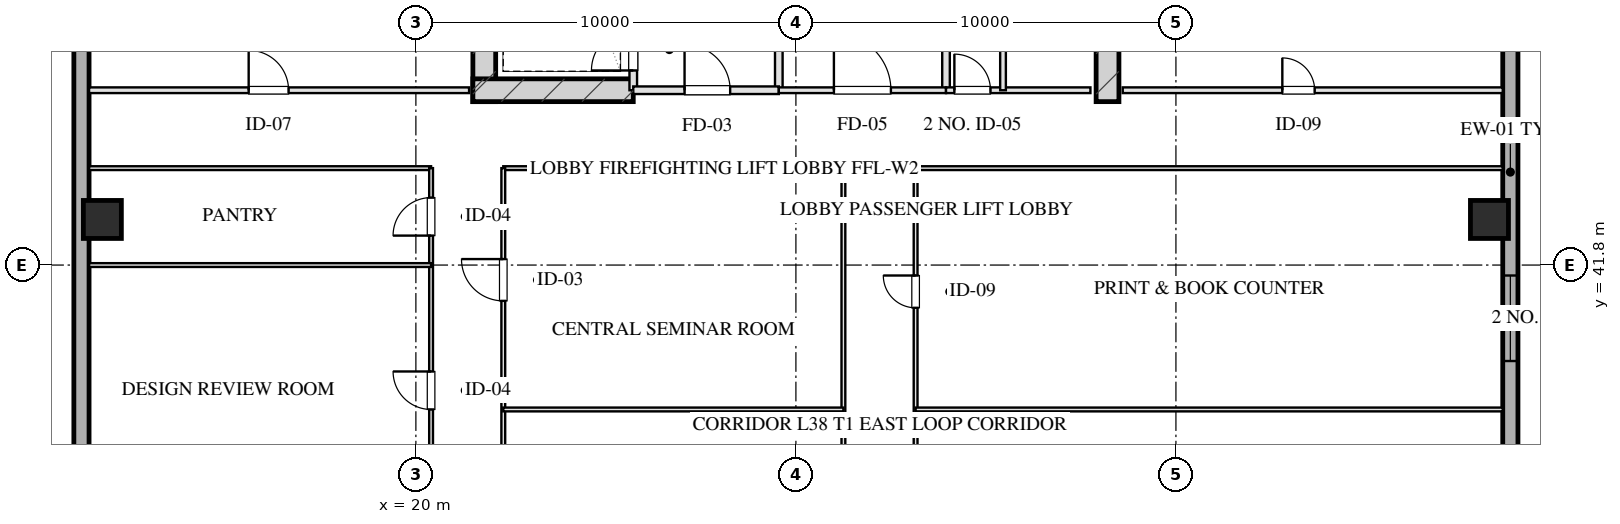
"""IFC4 building model, lengths in metres.
Left out: names, types, materials, properties, quantities, classifications, styles, units other than length and angle.
Written with IfcOpenShell. Run it as: python <this file> out.ifc"""

import sys

from ifc_helpers import new_model, si_unit, direction, frame, frame_2d, origin, origin_2d, place, context, subcontext, project, spatial, rectangle, hollow_rectangle, extrude, element, fill, save


model = new_model("IFC4")
c1 = context("Model", 3, precision=1e-05, world=origin(), true_north=direction((0.0, 1.0)))
c2 = subcontext(c1, "Body", "Model", "MODEL_VIEW")
j1 = project(units=[si_unit("LENGTHUNIT", "METRE"), si_unit("PLANEANGLEUNIT", "RADIAN")], contexts=[c1])
p1 = place(None, origin())
s1 = spatial("IfcSite", under=j1, at=p1, CompositionType="ELEMENT")
p2 = place(p1, origin())
s2 = spatial("IfcBuilding", under=s1, at=p2, CompositionType="ELEMENT")
p3 = place(p2, frame((0.0, 0.0, 146.05)))
s3 = spatial("IfcBuildingStorey", under=s2, at=p3, CompositionType="ELEMENT", Elevation=146.05)
for number, where, z_axis, x_axis in (
    (1, (21.8, 46.1, 0.0), (0.0, 0.0, 1.0), (0.0, 1.0, 0.0)),
    (2, (38.2, 46.1, 0.0), (0.0, 0.0, 1.0), (0.0, 1.0, 0.0)),
):
    element("IfcWall", number, at=place(p3, frame(where, z_axis=z_axis, x_axis=x_axis)), inside=s3, PredefinedType="SHEAR", context=c2, shape_type="SweptSolid", body=[
        extrude(rectangle(XDim=9.48, YDim=0.6, at=frame_2d((4.74, 0.0))), origin(), (0.0, 0.0, 1.0), 3.45),
    ])
p4 = place(p3, frame((21.5, 46.4, 0.0), z_axis=(0.0, 0.0, 1.0), x_axis=(1.0, 0.0, 0.0)))
e3 = element("IfcWall", 3, at=p4, inside=s3, PredefinedType="SHEAR", context=c2, shape_type="SweptSolid", body=[
    extrude(rectangle(XDim=4.22, YDim=0.6, at=frame_2d((2.11, 0.0))), origin(), (0.0, 0.0, 1.0), 3.45),
])
for number, where, z_axis, x_axis in (
    (4, (11.75, 43.0, 0.0), (0.0, 0.0, 1.0), (1.0, 0.0, 0.0)),
    (5, (48.25, 43.0, 0.0), (0.0, 0.0, 1.0), (1.0, 0.0, 0.0)),
):
    element("IfcColumn", number, at=place(p3, frame(where, z_axis=z_axis, x_axis=x_axis)), inside=s3, PredefinedType="COLUMN", context=c2, shape_type="SweptSolid", body=[
        extrude(hollow_rectangle(XDim=1.0, YDim=1.0, WallThickness=0.036, at=origin_2d()), origin(), (0.0, 0.0, 1.0), 3.451),
    ])
p5 = place(p3, frame((11.2, 9.0, 0.0), z_axis=(0.0, 0.0, 1.0), x_axis=(0.0, 1.0, 0.0)))
e6 = element("IfcWall", 6, at=p5, inside=s3, PredefinedType="SOLIDWALL", context=c2, shape_type="SweptSolid", body=[
    extrude(rectangle(XDim=50.0, YDim=0.4, at=frame_2d((25.0, 0.0))), origin(), (0.0, 0.0, 1.0), 2.61),
])
p6 = place(p5, frame((20.05, 0.0, 0.0)))
e7 = element("IfcOpeningElement", 7, at=p6, cuts=e6, PredefinedType="OPENING", context=c2, shape_type="SweptSolid", body=[
    extrude(rectangle(XDim=1.1, YDim=2.15, at=frame_2d((0.55, 1.075))), frame((0.0, 0.21, 0.0), z_axis=(0.0, -1.0, 0.0), x_axis=(1.0, 0.0, 0.0)), (0.0, 0.0, 1.0), 0.42),
])
p7 = place(p3, frame((48.8, 59.0, 0.0), z_axis=(0.0, 0.0, 1.0), x_axis=(0.0, -1.0, 0.0)))
e8 = element("IfcWall", 8, at=p7, inside=s3, PredefinedType="SOLIDWALL", context=c2, shape_type="SweptSolid", body=[
    extrude(rectangle(XDim=50.0, YDim=0.4, at=frame_2d((25.0, 0.0))), origin(), (0.0, 0.0, 1.0), 2.61),
])
p8 = place(p7, frame((17.475, 0.0, 0.75)))
e9 = element("IfcOpeningElement", 9, at=p8, cuts=e8, PredefinedType="OPENING", context=c2, shape_type="SweptSolid", body=[
    extrude(rectangle(XDim=2.25, YDim=1.46, at=frame_2d((1.125, 0.73))), frame((0.0, 0.21, 0.0), z_axis=(0.0, -1.0, 0.0), x_axis=(1.0, 0.0, 0.0)), (0.0, 0.0, 1.0), 0.42),
])
p9 = place(p7, frame((30.258, 0.0, 0.0)))
e10 = element("IfcOpeningElement", 10, at=p9, cuts=e8, PredefinedType="OPENING", context=c2, shape_type="SweptSolid", body=[
    extrude(rectangle(XDim=1.1, YDim=2.15, at=frame_2d((0.55, 1.075))), frame((0.0, 0.21, 0.0), z_axis=(0.0, -1.0, 0.0), x_axis=(1.0, 0.0, 0.0)), (0.0, 0.0, 1.0), 0.42),
])
p10 = place(p3, frame((25.72, 46.4, 0.0), z_axis=(0.0, 0.0, 1.0), x_axis=(0.0, 1.0, 0.0)))
e11 = element("IfcWall", 11, at=p10, inside=s3, PredefinedType="PARTITIONING", context=c2, shape_type="SweptSolid", body=[
    extrude(rectangle(XDim=1.9, YDim=0.2, at=frame_2d((0.95, 0.0))), origin(), (0.0, 0.0, 1.0), 3.175),
])
p11 = place(p10, frame((0.52, 0.0, 0.0)))
e12 = element("IfcOpeningElement", 12, at=p11, cuts=e11, PredefinedType="OPENING", context=c2, shape_type="SweptSolid", body=[
    extrude(rectangle(XDim=1.1, YDim=2.05, at=frame_2d((0.55, 1.025))), frame((0.0, 0.11, 0.0), z_axis=(0.0, -1.0, 0.0), x_axis=(1.0, 0.0, 0.0)), (0.0, 0.0, 1.0), 0.22),
])
p12 = place(p3, frame((29.55, 46.4, 0.0), z_axis=(0.0, 0.0, 1.0), x_axis=(0.0, 1.0, 0.0)))
e13 = element("IfcWall", 13, at=p12, inside=s3, PredefinedType="PARTITIONING", context=c2, shape_type="SweptSolid", body=[
    extrude(rectangle(XDim=8.43, YDim=0.2, at=frame_2d((4.215, 0.0))), origin(), (0.0, 0.0, 1.0), 3.175),
])
p13 = place(p3, frame((25.72, 46.4, 0.0), z_axis=(0.0, 0.0, 1.0), x_axis=(1.0, 0.0, 0.0)))
e14 = element("IfcWall", 14, at=p13, inside=s3, PredefinedType="PARTITIONING", context=c2, shape_type="SweptSolid", body=[
    extrude(rectangle(XDim=3.83, YDim=0.2, at=frame_2d((1.915, 0.0))), origin(), (0.0, 0.0, 1.0), 3.175),
])
p14 = place(p13, frame((1.35, 0.0, 0.0)))
e15 = element("IfcOpeningElement", 15, at=p14, cuts=e14, PredefinedType="OPENING", context=c2, shape_type="SweptSolid", body=[
    extrude(rectangle(XDim=1.2, YDim=2.05, at=frame_2d((0.6, 1.025))), frame((0.0, 0.11, 0.0), z_axis=(0.0, -1.0, 0.0), x_axis=(1.0, 0.0, 0.0)), (0.0, 0.0, 1.0), 0.22),
])
p15 = place(p3, frame((33.95, 46.4, 0.0), z_axis=(0.0, 0.0, 1.0), x_axis=(0.0, 1.0, 0.0)))
e16 = element("IfcWall", 16, at=p15, inside=s3, PredefinedType="PARTITIONING", context=c2, shape_type="SweptSolid", body=[
    extrude(rectangle(XDim=8.43, YDim=0.2, at=frame_2d((4.215, 0.0))), origin(), (0.0, 0.0, 1.0), 3.175),
])
p16 = place(p3, frame((29.55, 46.4, 0.0), z_axis=(0.0, 0.0, 1.0), x_axis=(1.0, 0.0, 0.0)))
e17 = element("IfcWall", 17, at=p16, inside=s3, PredefinedType="PARTITIONING", context=c2, shape_type="SweptSolid", body=[
    extrude(rectangle(XDim=4.4, YDim=0.15, at=frame_2d((2.2, 0.0))), origin(), (0.0, 0.0, 1.0), 3.175),
])
p17 = place(p16, frame((1.45, 0.0, 0.0)))
e18 = element("IfcOpeningElement", 18, at=p17, cuts=e17, PredefinedType="OPENING", context=c2, shape_type="SweptSolid", body=[
    extrude(rectangle(XDim=1.5, YDim=2.05, at=frame_2d((0.75, 1.025))), frame((0.0, 0.085, 0.0), z_axis=(0.0, -1.0, 0.0), x_axis=(1.0, 0.0, 0.0)), (0.0, 0.0, 1.0), 0.17),
])
p18 = place(p3, frame((33.95, 46.4, 0.0), z_axis=(0.0, 0.0, 1.0), x_axis=(1.0, 0.0, 0.0)))
e19 = element("IfcWall", 19, at=p18, inside=s3, PredefinedType="PARTITIONING", context=c2, shape_type="SweptSolid", body=[
    extrude(rectangle(XDim=3.8, YDim=0.15, at=frame_2d((1.9, 0.0))), origin(), (0.0, 0.0, 1.0), 3.175),
])
p19 = place(p18, frame((0.22, 0.0, 0.0)))
e20 = element("IfcOpeningElement", 20, at=p19, cuts=e19, PredefinedType="OPENING", context=c2, shape_type="SweptSolid", body=[
    extrude(rectangle(XDim=0.95, YDim=2.05, at=frame_2d((0.475, 1.025))), frame((0.0, 0.085, 0.0), z_axis=(0.0, -1.0, 0.0), x_axis=(1.0, 0.0, 0.0)), (0.0, 0.0, 1.0), 0.17),
])
p20 = place(p3, frame((35.45, 46.4, 0.0), z_axis=(0.0, 0.0, 1.0), x_axis=(0.0, 1.0, 0.0)))
e21 = element("IfcWall", 21, at=p20, inside=s3, PredefinedType="PARTITIONING", context=c2, shape_type="SweptSolid", body=[
    extrude(rectangle(XDim=8.43, YDim=0.15, at=frame_2d((4.215, 0.0))), origin(), (0.0, 0.0, 1.0), 2.765),
])
p21 = place(p20, frame((2.55, 0.0, 0.0)))
e22 = element("IfcOpeningElement", 22, at=p21, cuts=e21, PredefinedType="OPENING", context=c2, shape_type="SweptSolid", body=[
    extrude(rectangle(XDim=0.95, YDim=2.05, at=frame_2d((0.475, 1.025))), frame((0.0, 0.085, 0.0), z_axis=(0.0, -1.0, 0.0), x_axis=(1.0, 0.0, 0.0)), (0.0, 0.0, 1.0), 0.17),
])
p22 = place(p20, frame((4.7, 0.0, 0.0)))
e23 = element("IfcOpeningElement", 23, at=p22, cuts=e21, PredefinedType="OPENING", context=c2, shape_type="SweptSolid", body=[
    extrude(rectangle(XDim=0.9, YDim=2.05, at=frame_2d((0.45, 1.025))), frame((0.0, 0.085, 0.0), z_axis=(0.0, -1.0, 0.0), x_axis=(1.0, 0.0, 0.0)), (0.0, 0.0, 1.0), 0.17),
])
p23 = place(p20, frame((6.8, 0.0, 0.0)))
e24 = element("IfcOpeningElement", 24, at=p23, cuts=e21, PredefinedType="OPENING", context=c2, shape_type="SweptSolid", body=[
    extrude(rectangle(XDim=0.9, YDim=2.05, at=frame_2d((0.45, 1.025))), frame((0.0, 0.085, 0.0), z_axis=(0.0, -1.0, 0.0), x_axis=(1.0, 0.0, 0.0)), (0.0, 0.0, 1.0), 0.17),
])
p24 = place(p3, frame((11.4, 46.4, 0.0), z_axis=(0.0, 0.0, 1.0), x_axis=(1.0, 0.0, 0.0)))
e25 = element("IfcWall", 25, at=p24, inside=s3, PredefinedType="PARTITIONING", context=c2, shape_type="SweptSolid", body=[
    extrude(rectangle(XDim=10.0, YDim=0.15, at=frame_2d((5.0, 0.0))), origin(), (0.0, 0.0, 1.0), 3.175),
])
p25 = place(p24, frame((4.2, 0.0, 0.0)))
e26 = element("IfcOpeningElement", 26, at=p25, cuts=e25, PredefinedType="OPENING", context=c2, shape_type="SweptSolid", body=[
    extrude(rectangle(XDim=1.05, YDim=2.05, at=frame_2d((0.525, 1.025))), frame((0.0, 0.085, 0.0), z_axis=(0.0, -1.0, 0.0), x_axis=(1.0, 0.0, 0.0)), (0.0, 0.0, 1.0), 0.17),
])
p26 = place(p3, frame((38.6, 46.4, 0.0), z_axis=(0.0, 0.0, 1.0), x_axis=(1.0, 0.0, 0.0)))
e27 = element("IfcWall", 27, at=p26, inside=s3, PredefinedType="PARTITIONING", context=c2, shape_type="SweptSolid", body=[
    extrude(rectangle(XDim=10.0, YDim=0.15, at=frame_2d((5.0, 0.0))), origin(), (0.0, 0.0, 1.0), 3.175),
])
p27 = place(p26, frame((4.2, 0.0, 0.0)))
e28 = element("IfcOpeningElement", 28, at=p27, cuts=e27, PredefinedType="OPENING", context=c2, shape_type="SweptSolid", body=[
    extrude(rectangle(XDim=0.85, YDim=2.05, at=frame_2d((0.425, 1.025))), frame((0.0, 0.085, 0.0), z_axis=(0.0, -1.0, 0.0), x_axis=(1.0, 0.0, 0.0)), (0.0, 0.0, 1.0), 0.17),
])
p28 = place(p3, frame((11.4, 44.35, 0.0), z_axis=(0.0, 0.0, 1.0), x_axis=(1.0, 0.0, 0.0)))
e29 = element("IfcWall", 29, at=p28, inside=s3, PredefinedType="MOVABLE", context=c2, shape_type="SweptSolid", body=[
    extrude(rectangle(XDim=9.0, YDim=0.1, at=frame_2d((4.5, 0.0))), origin(), (0.0, 0.0, 1.0), 3.175),
])
p29 = place(p3, frame((22.3, 44.35, 0.0), z_axis=(0.0, 0.0, 1.0), x_axis=(1.0, 0.0, 0.0)))
e30 = element("IfcWall", 30, at=p29, inside=s3, PredefinedType="MOVABLE", context=c2, shape_type="SweptSolid", body=[
    extrude(rectangle(XDim=8.95, YDim=0.1, at=frame_2d((4.475, 0.0))), origin(), (0.0, 0.0, 1.0), 3.175),
])
p30 = place(p3, frame((33.15, 44.35, 0.0), z_axis=(0.0, 0.0, 1.0), x_axis=(1.0, 0.0, 0.0)))
e31 = element("IfcWall", 31, at=p30, inside=s3, PredefinedType="MOVABLE", context=c2, shape_type="SweptSolid", body=[
    extrude(rectangle(XDim=15.45, YDim=0.1, at=frame_2d((7.725, 0.0))), origin(), (0.0, 0.0, 1.0), 3.175),
])
p31 = place(p3, frame((20.4, 23.65, 0.0), z_axis=(0.0, 0.0, 1.0), x_axis=(0.0, 1.0, 0.0)))
e32 = element("IfcWall", 32, at=p31, inside=s3, PredefinedType="MOVABLE", context=c2, shape_type="SweptSolid", body=[
    extrude(rectangle(XDim=20.7, YDim=0.1, at=frame_2d((10.35, 0.0))), origin(), (0.0, 0.0, 1.0), 3.175),
])
p32 = place(p31, frame((0.775, 0.0, 0.0)))
e33 = element("IfcOpeningElement", 33, at=p32, cuts=e32, PredefinedType="OPENING", context=c2, shape_type="SweptSolid", body=[
    extrude(rectangle(XDim=1.0, YDim=2.05, at=frame_2d((0.5, 1.025))), frame((0.0, 0.06, 0.0), z_axis=(0.0, -1.0, 0.0), x_axis=(1.0, 0.0, 0.0)), (0.0, 0.0, 1.0), 0.12),
])
p33 = place(p31, frame((5.35, 0.0, 0.0)))
e34 = element("IfcOpeningElement", 34, at=p33, cuts=e32, PredefinedType="OPENING", context=c2, shape_type="SweptSolid", body=[
    extrude(rectangle(XDim=1.0, YDim=2.05, at=frame_2d((0.5, 1.025))), frame((0.0, 0.06, 0.0), z_axis=(0.0, -1.0, 0.0), x_axis=(1.0, 0.0, 0.0)), (0.0, 0.0, 1.0), 0.12),
])
p34 = place(p31, frame((9.85, 0.0, 0.0)))
e35 = element("IfcOpeningElement", 35, at=p34, cuts=e32, PredefinedType="OPENING", context=c2, shape_type="SweptSolid", body=[
    extrude(rectangle(XDim=1.0, YDim=2.05, at=frame_2d((0.5, 1.025))), frame((0.0, 0.06, 0.0), z_axis=(0.0, -1.0, 0.0), x_axis=(1.0, 0.0, 0.0)), (0.0, 0.0, 1.0), 0.12),
])
p35 = place(p31, frame((14.35, 0.0, 0.0)))
e36 = element("IfcOpeningElement", 36, at=p35, cuts=e32, PredefinedType="OPENING", context=c2, shape_type="SweptSolid", body=[
    extrude(rectangle(XDim=1.0, YDim=2.05, at=frame_2d((0.5, 1.025))), frame((0.0, 0.06, 0.0), z_axis=(0.0, -1.0, 0.0), x_axis=(1.0, 0.0, 0.0)), (0.0, 0.0, 1.0), 0.12),
])
p36 = place(p31, frame((18.925, 0.0, 0.0)))
e37 = element("IfcOpeningElement", 37, at=p36, cuts=e32, PredefinedType="OPENING", context=c2, shape_type="SweptSolid", body=[
    extrude(rectangle(XDim=1.0, YDim=2.05, at=frame_2d((0.5, 1.025))), frame((0.0, 0.06, 0.0), z_axis=(0.0, -1.0, 0.0), x_axis=(1.0, 0.0, 0.0)), (0.0, 0.0, 1.0), 0.12),
])
p37 = place(p3, frame((22.3, 23.65, 0.0), z_axis=(0.0, 0.0, 1.0), x_axis=(0.0, 1.0, 0.0)))
e38 = element("IfcWall", 38, at=p37, inside=s3, PredefinedType="MOVABLE", context=c2, shape_type="SweptSolid", body=[
    extrude(rectangle(XDim=20.7, YDim=0.1, at=frame_2d((10.35, 0.0))), origin(), (0.0, 0.0, 1.0), 3.175),
])
p38 = place(p37, frame((2.857, 0.0, 0.0)))
e39 = element("IfcOpeningElement", 39, at=p38, cuts=e38, PredefinedType="OPENING", context=c2, shape_type="SweptSolid", body=[
    extrude(rectangle(XDim=1.1, YDim=2.05, at=frame_2d((0.55, 1.025))), frame((0.0, 0.06, 0.0), z_axis=(0.0, -1.0, 0.0), x_axis=(1.0, 0.0, 0.0)), (0.0, 0.0, 1.0), 0.12),
])
p39 = place(p37, frame((17.208, 0.0, 0.0)))
e40 = element("IfcOpeningElement", 40, at=p39, cuts=e38, PredefinedType="OPENING", context=c2, shape_type="SweptSolid", body=[
    extrude(rectangle(XDim=1.1, YDim=2.05, at=frame_2d((0.55, 1.025))), frame((0.0, 0.06, 0.0), z_axis=(0.0, -1.0, 0.0), x_axis=(1.0, 0.0, 0.0)), (0.0, 0.0, 1.0), 0.12),
])
p40 = place(p3, frame((31.25, 23.65, 0.0), z_axis=(0.0, 0.0, 1.0), x_axis=(0.0, 1.0, 0.0)))
e41 = element("IfcWall", 41, at=p40, inside=s3, PredefinedType="MOVABLE", context=c2, shape_type="SweptSolid", body=[
    extrude(rectangle(XDim=20.7, YDim=0.1, at=frame_2d((10.35, 0.0))), origin(), (0.0, 0.0, 1.0), 3.175),
])
p41 = place(p40, frame((9.71, 0.0, 0.0)))
e42 = element("IfcOpeningElement", 42, at=p41, cuts=e41, PredefinedType="OPENING", context=c2, shape_type="SweptSolid", body=[
    extrude(rectangle(XDim=1.1, YDim=2.05, at=frame_2d((0.55, 1.025))), frame((0.0, 0.06, 0.0), z_axis=(0.0, -1.0, 0.0), x_axis=(1.0, 0.0, 0.0)), (0.0, 0.0, 1.0), 0.12),
])
p42 = place(p3, frame((33.15, 23.65, 0.0), z_axis=(0.0, 0.0, 1.0), x_axis=(0.0, 1.0, 0.0)))
e43 = element("IfcWall", 43, at=p42, inside=s3, PredefinedType="MOVABLE", context=c2, shape_type="SweptSolid", body=[
    extrude(rectangle(XDim=20.7, YDim=0.1, at=frame_2d((10.35, 0.0))), origin(), (0.0, 0.0, 1.0), 3.175),
])
p43 = place(p42, frame((2.667, 0.0, 0.0)))
e44 = element("IfcOpeningElement", 44, at=p43, cuts=e43, PredefinedType="OPENING", context=c2, shape_type="SweptSolid", body=[
    extrude(rectangle(XDim=1.0, YDim=2.05, at=frame_2d((0.5, 1.025))), frame((0.0, 0.06, 0.0), z_axis=(0.0, -1.0, 0.0), x_axis=(1.0, 0.0, 0.0)), (0.0, 0.0, 1.0), 0.12),
])
p44 = place(p42, frame((9.843, 0.0, 0.0)))
e45 = element("IfcOpeningElement", 45, at=p44, cuts=e43, PredefinedType="OPENING", context=c2, shape_type="SweptSolid", body=[
    extrude(rectangle(XDim=1.0, YDim=2.05, at=frame_2d((0.5, 1.025))), frame((0.0, 0.06, 0.0), z_axis=(0.0, -1.0, 0.0), x_axis=(1.0, 0.0, 0.0)), (0.0, 0.0, 1.0), 0.12),
])
p45 = place(p42, frame((17.025, 0.0, 0.0)))
e46 = element("IfcOpeningElement", 46, at=p45, cuts=e43, PredefinedType="OPENING", context=c2, shape_type="SweptSolid", body=[
    extrude(rectangle(XDim=0.85, YDim=2.05, at=frame_2d((0.425, 1.025))), frame((0.0, 0.06, 0.0), z_axis=(0.0, -1.0, 0.0), x_axis=(1.0, 0.0, 0.0)), (0.0, 0.0, 1.0), 0.12),
])
p46 = place(p3, frame((22.3, 38.0, 0.0), z_axis=(0.0, 0.0, 1.0), x_axis=(1.0, 0.0, 0.0)))
e47 = element("IfcWall", 47, at=p46, inside=s3, PredefinedType="MOVABLE", context=c2, shape_type="SweptSolid", body=[
    extrude(rectangle(XDim=8.95, YDim=0.1, at=frame_2d((4.475, 0.0))), origin(), (0.0, 0.0, 1.0), 3.175),
])
p47 = place(p3, frame((11.4, 41.8, 0.0), z_axis=(0.0, 0.0, 1.0), x_axis=(1.0, 0.0, 0.0)))
e48 = element("IfcWall", 48, at=p47, inside=s3, PredefinedType="MOVABLE", context=c2, shape_type="SweptSolid", body=[
    extrude(rectangle(XDim=9.0, YDim=0.1, at=frame_2d((4.5, 0.0))), origin(), (0.0, 0.0, 1.0), 3.175),
])
p48 = place(p3, frame((33.15, 38.0, 0.0), z_axis=(0.0, 0.0, 1.0), x_axis=(1.0, 0.0, 0.0)))
e49 = element("IfcWall", 49, at=p48, inside=s3, PredefinedType="MOVABLE", context=c2, shape_type="SweptSolid", body=[
    extrude(rectangle(XDim=15.45, YDim=0.1, at=frame_2d((7.725, 0.0))), origin(), (0.0, 0.0, 1.0), 3.175),
])
p49 = place(p8, origin())
e50 = element("IfcWindow", 50, at=p49, inside=s3, PartitioningType="TRIPLE_PANEL_VERTICAL", PredefinedType="WINDOW", context=c2, shape_type="SweptSolid", body=[
    extrude(rectangle(XDim=2.25, YDim=1.46, at=frame_2d((1.125, 0.73))), frame((0.0, 0.03, 0.0), z_axis=(0.0, -1.0, 0.0), x_axis=(1.0, 0.0, 0.0)), (0.0, 0.0, 1.0), 0.06),
])
fill(e9, e50)
p50 = place(p11, origin())
e51 = element("IfcDoor", 51, at=p50, inside=s3, OperationType="SINGLE_SWING_LEFT", PredefinedType="DOOR", context=c2, shape_type="SweptSolid", body=[
    extrude(rectangle(XDim=1.1, YDim=2.05, at=frame_2d((0.55, 1.025))), frame((0.0, 0.025, 0.0), z_axis=(0.0, -1.0, 0.0), x_axis=(1.0, 0.0, 0.0)), (0.0, 0.0, 1.0), 0.05),
])
fill(e12, e51)
p51 = place(p14, origin())
e52 = element("IfcDoor", 52, at=p51, inside=s3, OperationType="SINGLE_SWING_LEFT", PredefinedType="DOOR", context=c2, shape_type="SweptSolid", body=[
    extrude(rectangle(XDim=1.2, YDim=2.05, at=frame_2d((0.6, 1.025))), frame((0.0, 0.025, 0.0), z_axis=(0.0, -1.0, 0.0), x_axis=(1.0, 0.0, 0.0)), (0.0, 0.0, 1.0), 0.05),
])
fill(e15, e52)
p52 = place(p17, origin())
e53 = element("IfcDoor", 53, at=p52, inside=s3, OperationType="SINGLE_SWING_LEFT", PredefinedType="DOOR", context=c2, shape_type="SweptSolid", body=[
    extrude(rectangle(XDim=1.5, YDim=2.05, at=frame_2d((0.75, 1.025))), frame((0.0, 0.025, 0.0), z_axis=(0.0, -1.0, 0.0), x_axis=(1.0, 0.0, 0.0)), (0.0, 0.0, 1.0), 0.05),
])
fill(e18, e53)
p53 = place(p19, origin())
e54 = element("IfcDoor", 54, at=p53, inside=s3, OperationType="SINGLE_SWING_LEFT", PredefinedType="DOOR", context=c2, shape_type="SweptSolid", body=[
    extrude(rectangle(XDim=0.95, YDim=2.05, at=frame_2d((0.475, 1.025))), frame((0.0, 0.025, 0.0), z_axis=(0.0, -1.0, 0.0), x_axis=(1.0, 0.0, 0.0)), (0.0, 0.0, 1.0), 0.05),
])
fill(e20, e54)
p54 = place(p25, origin())
e55 = element("IfcDoor", 55, at=p54, inside=s3, OperationType="SINGLE_SWING_LEFT", PredefinedType="DOOR", context=c2, shape_type="SweptSolid", body=[
    extrude(rectangle(XDim=1.05, YDim=2.05, at=frame_2d((0.525, 1.025))), frame((0.0, 0.025, 0.0), z_axis=(0.0, -1.0, 0.0), x_axis=(1.0, 0.0, 0.0)), (0.0, 0.0, 1.0), 0.05),
])
fill(e26, e55)
p55 = place(p27, origin())
e56 = element("IfcDoor", 56, at=p55, inside=s3, OperationType="SINGLE_SWING_LEFT", PredefinedType="DOOR", context=c2, shape_type="SweptSolid", body=[
    extrude(rectangle(XDim=0.85, YDim=2.05, at=frame_2d((0.425, 1.025))), frame((0.0, 0.025, 0.0), z_axis=(0.0, -1.0, 0.0), x_axis=(1.0, 0.0, 0.0)), (0.0, 0.0, 1.0), 0.05),
])
fill(e28, e56)
p56 = place(p35, origin())
e57 = element("IfcDoor", 57, at=p56, inside=s3, OperationType="SINGLE_SWING_RIGHT", PredefinedType="DOOR", context=c2, shape_type="SweptSolid", body=[
    extrude(rectangle(XDim=1.0, YDim=2.05, at=frame_2d((0.5, 1.025))), frame((0.0, 0.025, 0.0), z_axis=(0.0, -1.0, 0.0), x_axis=(1.0, 0.0, 0.0)), (0.0, 0.0, 1.0), 0.05),
])
fill(e36, e57)
p57 = place(p36, origin())
e58 = element("IfcDoor", 58, at=p57, inside=s3, OperationType="SINGLE_SWING_LEFT", PredefinedType="DOOR", context=c2, shape_type="SweptSolid", body=[
    extrude(rectangle(XDim=1.0, YDim=2.05, at=frame_2d((0.5, 1.025))), frame((0.0, 0.025, 0.0), z_axis=(0.0, -1.0, 0.0), x_axis=(1.0, 0.0, 0.0)), (0.0, 0.0, 1.0), 0.05),
])
fill(e37, e58)
p58 = place(p39, origin())
e59 = element("IfcDoor", 59, at=p58, inside=s3, OperationType="SINGLE_SWING_RIGHT", PredefinedType="DOOR", context=c2, shape_type="SweptSolid", body=[
    extrude(rectangle(XDim=1.1, YDim=2.05, at=frame_2d((0.55, 1.025))), frame((0.0, 0.025, 0.0), z_axis=(0.0, -1.0, 0.0), x_axis=(1.0, 0.0, 0.0)), (0.0, 0.0, 1.0), 0.05),
])
fill(e40, e59)
p59 = place(p45, origin())
e60 = element("IfcDoor", 60, at=p59, inside=s3, OperationType="SINGLE_SWING_RIGHT", PredefinedType="DOOR", context=c2, shape_type="SweptSolid", body=[
    extrude(rectangle(XDim=0.85, YDim=2.05, at=frame_2d((0.425, 1.025))), frame((0.0, 0.025, 0.0), z_axis=(0.0, -1.0, 0.0), x_axis=(1.0, 0.0, 0.0)), (0.0, 0.0, 1.0), 0.05),
])
fill(e46, e60)
save(model, sys.argv[1])
